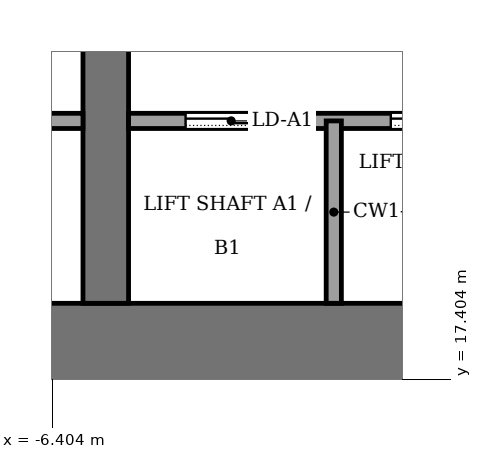
"""IFC4 building model, lengths in metres.
Left out: names, types, materials, properties, quantities, classifications, styles, units other than length and angle.
Written with IfcOpenShell. Run it as: python <this file> out.ifc"""

import sys

from ifc_helpers import new_model, si_unit, direction, frame, frame_2d, origin, place, context, subcontext, project, spatial, rectangle, extrude, element, fill, save


model = new_model("IFC4")
c1 = context("Model", 3, precision=1e-05, world=origin(), true_north=direction((0.0, 1.0)))
c2 = subcontext(c1, "Body", "Model", "MODEL_VIEW")
j1 = project(units=[si_unit("LENGTHUNIT", "METRE"), si_unit("PLANEANGLEUNIT", "RADIAN")], contexts=[c1])
p1 = place(None, origin())
s1 = spatial("IfcSite", under=j1, at=p1, CompositionType="ELEMENT")
p2 = place(p1, origin())
s2 = spatial("IfcBuilding", under=s1, at=p2, CompositionType="ELEMENT")
p3 = place(p2, frame((0.0, 0.0, 65.0)))
s3 = spatial("IfcBuildingStorey", under=s2, at=p3, CompositionType="ELEMENT", Elevation=65.0)
p4 = place(p3, frame((-13.8, 17.8, -0.13), z_axis=(0.0, 0.0, 1.0), x_axis=(1.0, 0.0, 0.0)))
e1 = element("IfcWall", 1, at=p4, inside=s3, PredefinedType="SHEAR", context=c2, shape_type="SweptSolid", body=[
    extrude(rectangle(XDim=27.6, YDim=1.2, at=frame_2d((13.8, 0.0))), origin(), (0.0, 0.0, 1.0), 5.0),
])
p5 = place(p3, frame((-5.7, 18.4, -0.13), z_axis=(0.0, 0.0, 1.0), x_axis=(0.0, 1.0, 0.0)))
e2 = element("IfcWall", 2, at=p5, inside=s3, PredefinedType="SHEAR", context=c2, shape_type="SweptSolid", body=[
    extrude(rectangle(XDim=19.2, YDim=0.6, at=frame_2d((9.6, 0.0))), origin(), (0.0, 0.0, 1.0), 5.0),
])
p6 = place(p5, frame((8.35, 0.0, 0.13)))
e3 = element("IfcOpeningElement", 3, at=p6, cuts=e2, PredefinedType="OPENING", context=c2, shape_type="SweptSolid", body=[
    extrude(rectangle(XDim=0.9, YDim=2.1, at=frame_2d((0.45, 1.05))), frame((0.0, 0.31, 0.0), z_axis=(0.0, -1.0, 0.0), x_axis=(1.0, 0.0, 0.0)), (0.0, 0.0, 1.0), 0.62),
])
p7 = place(p3, frame((-12.6, 20.8, 0.0), z_axis=(0.0, 0.0, 1.0), x_axis=(1.0, 0.0, 0.0)))
e4 = element("IfcWall", 4, at=p7, inside=s3, PredefinedType="PARTITIONING", context=c2, shape_type="SweptSolid", body=[
    extrude(rectangle(XDim=6.6, YDim=0.2, at=frame_2d((3.3, 0.0))), origin(), (0.0, 0.0, 1.0), 4.87),
])
p8 = place(p7, frame((0.49, 0.0, 0.0)))
e5 = element("IfcOpeningElement", 5, at=p8, cuts=e4, PredefinedType="OPENING", context=c2, shape_type="SweptSolid", body=[
    extrude(rectangle(XDim=1.0, YDim=2.1, at=frame_2d((0.5, 1.05))), frame((0.0, 0.11, 0.0), z_axis=(0.0, -1.0, 0.0), x_axis=(1.0, 0.0, 0.0)), (0.0, 0.0, 1.0), 0.22),
])
p9 = place(p7, frame((3.79, 0.0, 0.0)))
e6 = element("IfcOpeningElement", 6, at=p9, cuts=e4, PredefinedType="OPENING", context=c2, shape_type="SweptSolid", body=[
    extrude(rectangle(XDim=1.0, YDim=2.1, at=frame_2d((0.5, 1.05))), frame((0.0, 0.11, 0.0), z_axis=(0.0, -1.0, 0.0), x_axis=(1.0, 0.0, 0.0)), (0.0, 0.0, 1.0), 0.22),
])
p10 = place(p3, frame((-5.4, 20.8, 0.0), z_axis=(0.0, 0.0, 1.0), x_axis=(1.0, 0.0, 0.0)))
e7 = element("IfcWall", 7, at=p10, inside=s3, PredefinedType="PARTITIONING", context=c2, shape_type="SweptSolid", body=[
    extrude(rectangle(XDim=10.8, YDim=0.2, at=frame_2d((5.4, 0.0))), origin(), (0.0, 0.0, 1.0), 4.87),
])
p11 = place(p10, frame((0.75, 0.0, 0.0)))
e8 = element("IfcOpeningElement", 8, at=p11, cuts=e7, PredefinedType="OPENING", context=c2, shape_type="SweptSolid", body=[
    extrude(rectangle(XDim=1.2, YDim=2.2, at=frame_2d((0.6, 1.1))), frame((0.0, 0.11, 0.0), z_axis=(0.0, -1.0, 0.0), x_axis=(1.0, 0.0, 0.0)), (0.0, 0.0, 1.0), 0.22),
])
p12 = place(p10, frame((3.45, 0.0, 0.0)))
e9 = element("IfcOpeningElement", 9, at=p12, cuts=e7, PredefinedType="OPENING", context=c2, shape_type="SweptSolid", body=[
    extrude(rectangle(XDim=1.2, YDim=2.2, at=frame_2d((0.6, 1.1))), frame((0.0, 0.11, 0.0), z_axis=(0.0, -1.0, 0.0), x_axis=(1.0, 0.0, 0.0)), (0.0, 0.0, 1.0), 0.22),
])
p13 = place(p10, frame((6.15, 0.0, 0.0)))
e10 = element("IfcOpeningElement", 10, at=p13, cuts=e7, PredefinedType="OPENING", context=c2, shape_type="SweptSolid", body=[
    extrude(rectangle(XDim=1.2, YDim=2.2, at=frame_2d((0.6, 1.1))), frame((0.0, 0.11, 0.0), z_axis=(0.0, -1.0, 0.0), x_axis=(1.0, 0.0, 0.0)), (0.0, 0.0, 1.0), 0.22),
])
p14 = place(p10, frame((8.85, 0.0, 0.0)))
e11 = element("IfcOpeningElement", 11, at=p14, cuts=e7, PredefinedType="OPENING", context=c2, shape_type="SweptSolid", body=[
    extrude(rectangle(XDim=1.2, YDim=2.2, at=frame_2d((0.6, 1.1))), frame((0.0, 0.11, 0.0), z_axis=(0.0, -1.0, 0.0), x_axis=(1.0, 0.0, 0.0)), (0.0, 0.0, 1.0), 0.22),
])
p15 = place(p3, frame((-2.7, 18.4, 0.0), z_axis=(0.0, 0.0, 1.0), x_axis=(0.0, 1.0, 0.0)))
e12 = element("IfcWall", 12, at=p15, inside=s3, PredefinedType="PARTITIONING", context=c2, shape_type="SweptSolid", body=[
    extrude(rectangle(XDim=2.4, YDim=0.2, at=frame_2d((1.2, 0.0))), origin(), (0.0, 0.0, 1.0), 4.87),
])
p16 = place(p11, origin())
e13 = element("IfcDoor", 13, at=p16, inside=s3, OperationType="SLIDING_TO_LEFT", PredefinedType="DOOR", context=c2, shape_type="SweptSolid", body=[
    extrude(rectangle(XDim=1.2, YDim=2.2, at=frame_2d((0.6, 1.1))), frame((0.0, 0.025, 0.0), z_axis=(0.0, -1.0, 0.0), x_axis=(1.0, 0.0, 0.0)), (0.0, 0.0, 1.0), 0.05),
])
fill(e8, e13)
p17 = place(p12, origin())
e14 = element("IfcDoor", 14, at=p17, inside=s3, OperationType="SLIDING_TO_LEFT", PredefinedType="DOOR", context=c2, shape_type="SweptSolid", body=[
    extrude(rectangle(XDim=1.2, YDim=2.2, at=frame_2d((0.6, 1.1))), frame((0.0, 0.025, 0.0), z_axis=(0.0, -1.0, 0.0), x_axis=(1.0, 0.0, 0.0)), (0.0, 0.0, 1.0), 0.05),
])
fill(e9, e14)
save(model, sys.argv[1])
